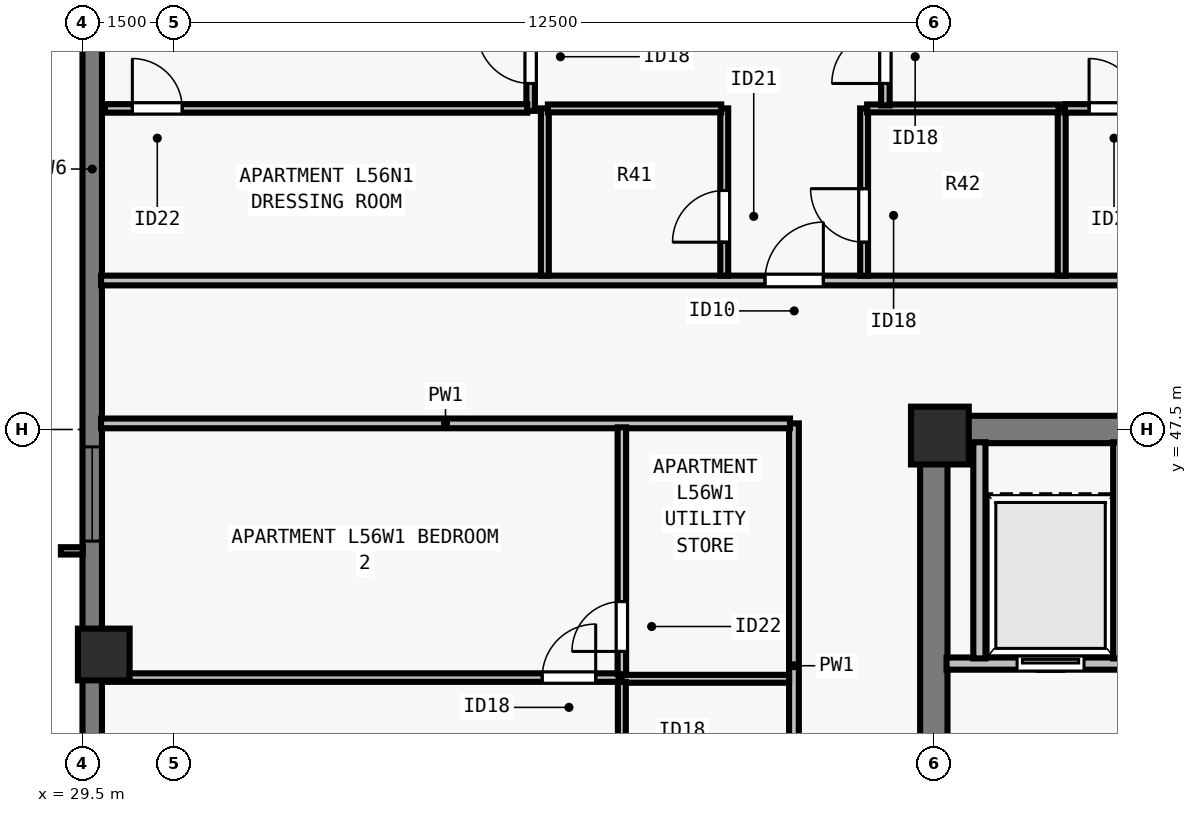
"""IFC4 building model, lengths in metres.
Left out: names, types, materials, properties, quantities, classifications, styles, units other than length and angle.
Written with IfcOpenShell. Run it as: python <this file> out.ifc"""

import sys

from ifc_helpers import new_model, si_unit, direction, frame, frame_2d, origin, origin_2d, place, context, subcontext, project, spatial, rectangle, extrude, element, fill, save


model = new_model("IFC4")
c1 = context("Model", 3, precision=1e-05, world=origin(), true_north=direction((0.0, 1.0)))
c2 = subcontext(c1, "Body", "Model", "MODEL_VIEW")
j1 = project(units=[si_unit("LENGTHUNIT", "METRE"), si_unit("PLANEANGLEUNIT", "RADIAN")], contexts=[c1])
p1 = place(None, origin())
s1 = spatial("IfcSite", under=j1, at=p1, CompositionType="ELEMENT")
p2 = place(p1, origin())
s2 = spatial("IfcBuilding", under=s1, at=p2, CompositionType="ELEMENT")
p3 = place(p2, frame((0.0, 0.0, 206.0)))
s3 = spatial("IfcBuildingStorey", under=s2, at=p3, CompositionType="ELEMENT", Elevation=206.0)
p4 = place(p3, frame((43.6, 47.4, 0.0), z_axis=(0.0, 0.0, 1.0), x_axis=(1.0, 0.0, 0.0)))
e1 = element("IfcColumn", 1, at=p4, inside=s3, PredefinedType="COLUMN", context=c2, shape_type="SweptSolid", body=[
    extrude(rectangle(XDim=0.95, YDim=0.95, at=origin_2d()), origin(), (0.0, 0.0, 1.0), 3.5),
])
p5 = place(p3, frame((29.85, 43.8, 0.0), z_axis=(0.0, 0.0, 1.0), x_axis=(0.0, 1.0, 0.0)))
e2 = element("IfcColumn", 2, at=p5, inside=s3, PredefinedType="COLUMN", context=c2, shape_type="SweptSolid", body=[
    extrude(rectangle(XDim=0.85, YDim=0.85, at=origin_2d()), origin(), (0.0, 0.0, 1.0), 3.5),
])
p6 = place(p3, frame((29.66, 21.5, 0.0), z_axis=(0.0, 0.0, 1.0), x_axis=(0.0, 1.0, 0.0)))
e3 = element("IfcWall", 3, at=p6, inside=s3, PredefinedType="SOLIDWALL", context=c2, shape_type="SweptSolid", body=[
    extrude(rectangle(XDim=34.702, YDim=0.32, at=frame_2d((17.351, 0.0))), origin(), (0.0, 0.0, 1.0), 3.29),
])
p7 = place(p6, frame((4.312, 0.0, 0.8)))
e4 = element("IfcOpeningElement", 4, at=p7, cuts=e3, PredefinedType="OPENING", context=c2, shape_type="SweptSolid", body=[
    extrude(rectangle(XDim=1.55, YDim=1.678, at=frame_2d((0.775, 0.839))), frame((0.0, 0.17, 0.0), z_axis=(0.0, -1.0, 0.0), x_axis=(1.0, 0.0, 0.0)), (0.0, 0.0, 1.0), 0.34),
])
p8 = place(p6, frame((9.238, 0.0, 0.8)))
e5 = element("IfcOpeningElement", 5, at=p8, cuts=e3, PredefinedType="OPENING", context=c2, shape_type="SweptSolid", body=[
    extrude(rectangle(XDim=1.85, YDim=1.678, at=frame_2d((0.925, 0.839))), frame((0.0, 0.17, 0.0), z_axis=(0.0, -1.0, 0.0), x_axis=(1.0, 0.0, 0.0)), (0.0, 0.0, 1.0), 0.34),
])
p9 = place(p6, frame((14.738, 0.0, 0.8)))
e6 = element("IfcOpeningElement", 6, at=p9, cuts=e3, PredefinedType="OPENING", context=c2, shape_type="SweptSolid", body=[
    extrude(rectangle(XDim=1.85, YDim=1.678, at=frame_2d((0.925, 0.839))), frame((0.0, 0.17, 0.0), z_axis=(0.0, -1.0, 0.0), x_axis=(1.0, 0.0, 0.0)), (0.0, 0.0, 1.0), 0.34),
])
p10 = place(p6, frame((17.014, 0.0, 0.8)))
e7 = element("IfcOpeningElement", 7, at=p10, cuts=e3, PredefinedType="OPENING", context=c2, shape_type="SweptSolid", body=[
    extrude(rectangle(XDim=1.55, YDim=1.678, at=frame_2d((0.775, 0.839))), frame((0.0, 0.17, 0.0), z_axis=(0.0, -1.0, 0.0), x_axis=(1.0, 0.0, 0.0)), (0.0, 0.0, 1.0), 0.34),
])
p11 = place(p6, frame((24.164, 0.0, 0.8)))
e8 = element("IfcOpeningElement", 8, at=p11, cuts=e3, PredefinedType="OPENING", context=c2, shape_type="SweptSolid", body=[
    extrude(rectangle(XDim=1.55, YDim=1.678, at=frame_2d((0.775, 0.839))), frame((0.0, 0.17, 0.0), z_axis=(0.0, -1.0, 0.0), x_axis=(1.0, 0.0, 0.0)), (0.0, 0.0, 1.0), 0.34),
])
p12 = place(p3, frame((43.275, 47.5, 0.0), z_axis=(0.0, 0.0, 1.0), x_axis=(1.0, 0.0, 0.0)))
e9 = element("IfcWall", 9, at=p12, inside=s3, PredefinedType="SHEAR", context=c2, shape_type="SweptSolid", body=[
    extrude(rectangle(XDim=17.45, YDim=0.45, at=frame_2d((8.725, 0.0))), origin(), (0.0, 0.0, 1.0), 3.29),
])
p13 = place(p3, frame((43.5, 40.8, 0.0), z_axis=(0.0, 0.0, 1.0), x_axis=(0.0, 1.0, 0.0)))
e10 = element("IfcWall", 10, at=p13, inside=s3, PredefinedType="SHEAR", context=c2, shape_type="SweptSolid", body=[
    extrude(rectangle(XDim=6.485, YDim=0.45, at=frame_2d((3.242, 0.0))), origin(), (0.0, 0.0, 1.0), 3.29),
])
p14 = place(p3, frame((43.71, 43.65, 0.0), z_axis=(0.0, 0.0, 1.0), x_axis=(1.0, 0.0, 0.0)))
e11 = element("IfcWall", 11, at=p14, inside=s3, PredefinedType="SOLIDWALL", context=c2, shape_type="SweptSolid", body=[
    extrude(rectangle(XDim=3.555, YDim=0.2, at=frame_2d((1.777, 0.0))), origin(), (0.0, 0.0, 1.0), 3.29),
])
p15 = place(p14, frame((1.16, 0.0, 0.0)))
e12 = element("IfcOpeningElement", 12, at=p15, cuts=e11, PredefinedType="OPENING", context=c2, shape_type="SweptSolid", body=[
    extrude(rectangle(XDim=1.1, YDim=2.2, at=frame_2d((0.55, 1.1))), frame((0.0, 0.11, 0.0), z_axis=(0.0, -1.0, 0.0), x_axis=(1.0, 0.0, 0.0)), (0.0, 0.0, 1.0), 0.22),
])
for number, where, z_axis, x_axis in (
    (13, (46.55, 43.735, 0.0), (0.0, 0.0, 1.0), (0.0, 1.0, 0.0)),
    (14, (44.25, 43.735, 0.0), (0.0, 0.0, 1.0), (0.0, 1.0, 0.0)),
):
    element("IfcWall", number, at=place(p3, frame(where, z_axis=z_axis, x_axis=x_axis)), inside=s3, PredefinedType="SOLIDWALL", context=c2, shape_type="SweptSolid", body=[
        extrude(rectangle(XDim=3.555, YDim=0.2, at=frame_2d((1.777, 0.0))), origin(), (0.0, 0.0, 1.0), 3.29),
    ])
p16 = place(p3, frame((29.805, 49.95, 0.0), z_axis=(0.0, 0.0, 1.0), x_axis=(1.0, 0.0, 0.0)))
e15 = element("IfcWall", 15, at=p16, inside=s3, PredefinedType="PARTITIONING", context=c2, shape_type="SweptSolid", body=[
    extrude(rectangle(XDim=44.39, YDim=0.16, at=frame_2d((22.195, 0.0))), origin(), (0.0, 0.0, 1.0), 2.958),
])
p17 = place(p16, frame((10.919, 0.0, 0.0)))
e16 = element("IfcOpeningElement", 16, at=p17, cuts=e15, PredefinedType="OPENING", context=c2, shape_type="SweptSolid", body=[
    extrude(rectangle(XDim=0.96, YDim=2.18, at=frame_2d((0.48, 1.09))), frame((0.0, 0.09, 0.0), z_axis=(0.0, -1.0, 0.0), x_axis=(1.0, 0.0, 0.0)), (0.0, 0.0, 1.0), 0.18),
])
p18 = place(p16, frame((32.999, 0.0, 0.0)))
e17 = element("IfcOpeningElement", 17, at=p18, cuts=e15, PredefinedType="OPENING", context=c2, shape_type="SweptSolid", body=[
    extrude(rectangle(XDim=0.96, YDim=2.18, at=frame_2d((0.48, 1.09))), frame((0.0, 0.09, 0.0), z_axis=(0.0, -1.0, 0.0), x_axis=(1.0, 0.0, 0.0)), (0.0, 0.0, 1.0), 0.18),
])
p19 = place(p3, frame((41.2, 30.4, 0.0), z_axis=(0.0, 0.0, 1.0), x_axis=(0.0, 1.0, 0.0)))
e18 = element("IfcWall", 18, at=p19, inside=s3, PredefinedType="PARTITIONING", context=c2, shape_type="SweptSolid", body=[
    extrude(rectangle(XDim=17.2, YDim=0.16, at=frame_2d((8.6, 0.0))), origin(), (0.0, 0.0, 1.0), 3.29),
])
p20 = place(p19, frame((8.12, 0.0, 0.0)))
e19 = element("IfcOpeningElement", 19, at=p20, cuts=e18, PredefinedType="OPENING", context=c2, shape_type="SweptSolid", body=[
    extrude(rectangle(XDim=0.96, YDim=2.18, at=frame_2d((0.48, 1.09))), frame((0.0, 0.09, 0.0), z_axis=(0.0, -1.0, 0.0), x_axis=(1.0, 0.0, 0.0)), (0.0, 0.0, 1.0), 0.18),
])
p21 = place(p3, frame((29.805, 47.6, 0.0), z_axis=(0.0, 0.0, 1.0), x_axis=(1.0, 0.0, 0.0)))
e20 = element("IfcWall", 20, at=p21, inside=s3, PredefinedType="PARTITIONING", context=c2, shape_type="SweptSolid", body=[
    extrude(rectangle(XDim=11.33, YDim=0.16, at=frame_2d((5.665, 0.0))), origin(), (0.0, 0.0, 1.0), 3.29),
])
p22 = place(p3, frame((37.104, 50.03, 0.0), z_axis=(0.0, 0.0, 1.0), x_axis=(0.0, 1.0, 0.0)))
e21 = element("IfcWall", 21, at=p22, inside=s3, PredefinedType="PLUMBINGWALL", context=c2, shape_type="SweptSolid", body=[
    extrude(rectangle(XDim=2.75, YDim=0.13, at=frame_2d((1.375, 0.0))), origin(), (0.0, 0.0, 1.0), 3.29),
])
p23 = place(p3, frame((40.054, 50.03, 0.0), z_axis=(0.0, 0.0, 1.0), x_axis=(0.0, 1.0, 0.0)))
e22 = element("IfcWall", 22, at=p23, inside=s3, PredefinedType="PLUMBINGWALL", context=c2, shape_type="SweptSolid", body=[
    extrude(rectangle(XDim=2.75, YDim=0.13, at=frame_2d((1.375, 0.0))), origin(), (0.0, 0.0, 1.0), 2.573),
])
p24 = place(p23, frame((0.55, 0.0, 0.0)))
e23 = element("IfcOpeningElement", 23, at=p24, cuts=e22, PredefinedType="OPENING", context=c2, shape_type="SweptSolid", body=[
    extrude(rectangle(XDim=0.85, YDim=2.08, at=frame_2d((0.425, 1.04))), frame((0.0, 0.075, 0.0), z_axis=(0.0, -1.0, 0.0), x_axis=(1.0, 0.0, 0.0)), (0.0, 0.0, 1.0), 0.15),
])
p25 = place(p3, frame((37.154, 52.78, 0.0), z_axis=(0.0, 0.0, 1.0), x_axis=(1.0, 0.0, 0.0)))
e24 = element("IfcWall", 24, at=p25, inside=s3, PredefinedType="PLUMBINGWALL", context=c2, shape_type="SweptSolid", body=[
    extrude(rectangle(XDim=2.85, YDim=0.13, at=frame_2d((1.425, 0.0))), origin(), (0.0, 0.0, 1.0), 3.29),
])
p26 = place(p3, frame((45.604, 50.03, 0.0), z_axis=(0.0, 0.0, 1.0), x_axis=(0.0, 1.0, 0.0)))
e25 = element("IfcWall", 25, at=p26, inside=s3, PredefinedType="PLUMBINGWALL", context=c2, shape_type="SweptSolid", body=[
    extrude(rectangle(XDim=2.75, YDim=0.13, at=frame_2d((1.375, 0.0))), origin(), (0.0, 0.0, 1.0), 3.29),
])
p27 = place(p3, frame((42.354, 50.03, 0.0), z_axis=(0.0, 0.0, 1.0), x_axis=(0.0, 1.0, 0.0)))
e26 = element("IfcWall", 26, at=p27, inside=s3, PredefinedType="PLUMBINGWALL", context=c2, shape_type="SweptSolid", body=[
    extrude(rectangle(XDim=2.75, YDim=0.13, at=frame_2d((1.375, 0.0))), origin(), (0.0, 0.0, 1.0), 3.29),
])
p28 = place(p27, frame((0.55, 0.0, 0.0)))
e27 = element("IfcOpeningElement", 27, at=p28, cuts=e26, PredefinedType="OPENING", context=c2, shape_type="SweptSolid", body=[
    extrude(rectangle(XDim=0.88, YDim=2.1, at=frame_2d((0.44, 1.05))), frame((0.0, 0.075, 0.0), z_axis=(0.0, -1.0, 0.0), x_axis=(1.0, 0.0, 0.0)), (0.0, 0.0, 1.0), 0.15),
])
p29 = place(p3, frame((42.404, 52.78, 0.0), z_axis=(0.0, 0.0, 1.0), x_axis=(1.0, 0.0, 0.0)))
e28 = element("IfcWall", 28, at=p29, inside=s3, PredefinedType="PLUMBINGWALL", context=c2, shape_type="SweptSolid", body=[
    extrude(rectangle(XDim=3.15, YDim=0.13, at=frame_2d((1.575, 0.0))), origin(), (0.0, 0.0, 1.0), 3.29),
])
p30 = place(p3, frame((36.87, 52.74, 0.0), z_axis=(0.0, 0.0, 1.0), x_axis=(0.0, 1.0, 0.0)))
e29 = element("IfcWall", 29, at=p30, inside=s3, PredefinedType="PARTITIONING", context=c2, shape_type="SweptSolid", body=[
    extrude(rectangle(XDim=8.38, YDim=0.14, at=frame_2d((4.19, 0.0))), origin(), (0.0, 0.0, 1.0), 2.573),
])
p31 = place(p30, frame((0.45, 0.0, 0.0)))
e30 = element("IfcOpeningElement", 30, at=p31, cuts=e29, PredefinedType="OPENING", context=c2, shape_type="SweptSolid", body=[
    extrude(rectangle(XDim=0.88, YDim=2.1, at=frame_2d((0.44, 1.05))), frame((0.0, 0.08, 0.0), z_axis=(0.0, -1.0, 0.0), x_axis=(1.0, 0.0, 0.0)), (0.0, 0.0, 1.0), 0.16),
])
p32 = place(p3, frame((29.87, 52.78, 0.0), z_axis=(0.0, 0.0, 1.0), x_axis=(1.0, 0.0, 0.0)))
e31 = element("IfcWall", 31, at=p32, inside=s3, PredefinedType="PARTITIONING", context=c2, shape_type="SweptSolid", body=[
    extrude(rectangle(XDim=6.945, YDim=0.14, at=frame_2d((3.472, 0.0))), origin(), (0.0, 0.0, 1.0), 2.958),
])
p33 = place(p32, frame((0.45, 0.0, 0.0)))
e32 = element("IfcOpeningElement", 32, at=p33, cuts=e31, PredefinedType="OPENING", context=c2, shape_type="SweptSolid", body=[
    extrude(rectangle(XDim=0.82, YDim=2.1, at=frame_2d((0.41, 1.05))), frame((0.0, 0.08, 0.0), z_axis=(0.0, -1.0, 0.0), x_axis=(1.0, 0.0, 0.0)), (0.0, 0.0, 1.0), 0.16),
])
p34 = place(p3, frame((45.654, 52.78, 0.0), z_axis=(0.0, 0.0, 1.0), x_axis=(1.0, 0.0, 0.0)))
e33 = element("IfcWall", 33, at=p34, inside=s3, PredefinedType="PARTITIONING", context=c2, shape_type="SweptSolid", body=[
    extrude(rectangle(XDim=6.884, YDim=0.14, at=frame_2d((3.442, 0.0))), origin(), (0.0, 0.0, 1.0), 3.29),
])
p35 = place(p34, frame((0.4, 0.0, 0.0)))
e34 = element("IfcOpeningElement", 34, at=p35, cuts=e33, PredefinedType="OPENING", context=c2, shape_type="SweptSolid", body=[
    extrude(rectangle(XDim=0.82, YDim=2.1, at=frame_2d((0.41, 1.05))), frame((0.0, 0.08, 0.0), z_axis=(0.0, -1.0, 0.0), x_axis=(1.0, 0.0, 0.0)), (0.0, 0.0, 1.0), 0.16),
])
p36 = place(p3, frame((42.704, 52.83, 0.0), z_axis=(0.0, 0.0, 1.0), x_axis=(0.0, 1.0, 0.0)))
e35 = element("IfcWall", 35, at=p36, inside=s3, PredefinedType="PARTITIONING", context=c2, shape_type="SweptSolid", body=[
    extrude(rectangle(XDim=8.29, YDim=0.14, at=frame_2d((4.145, 0.0))), origin(), (0.0, 0.0, 1.0), 3.29),
])
p37 = place(p36, frame((0.36, 0.0, 0.0)))
e36 = element("IfcOpeningElement", 36, at=p37, cuts=e35, PredefinedType="OPENING", context=c2, shape_type="SweptSolid", body=[
    extrude(rectangle(XDim=0.88, YDim=2.1, at=frame_2d((0.44, 1.05))), frame((0.0, 0.08, 0.0), z_axis=(0.0, -1.0, 0.0), x_axis=(1.0, 0.0, 0.0)), (0.0, 0.0, 1.0), 0.16),
])
p38 = place(p3, frame((38.37, 43.4, 0.0), z_axis=(0.0, 0.0, 1.0), x_axis=(1.0, 0.0, 0.0)))
e37 = element("IfcWall", 37, at=p38, inside=s3, PredefinedType="PLUMBINGWALL", context=c2, shape_type="SweptSolid", body=[
    extrude(rectangle(XDim=2.75, YDim=0.13, at=frame_2d((1.375, 0.0))), origin(), (0.0, 0.0, 1.0), 2.958),
])
p39 = place(p3, frame((38.37, 40.2, 0.0), z_axis=(0.0, 0.0, 1.0), x_axis=(0.0, 1.0, 0.0)))
e38 = element("IfcWall", 38, at=p39, inside=s3, PredefinedType="PLUMBINGWALL", context=c2, shape_type="SweptSolid", body=[
    extrude(rectangle(XDim=3.15, YDim=0.13, at=frame_2d((1.575, 0.0))), origin(), (0.0, 0.0, 1.0), 3.29),
])
p40 = place(p3, frame((29.88, 43.42, 0.0), z_axis=(0.0, 0.0, 1.0), x_axis=(1.0, 0.0, 0.0)))
e39 = element("IfcWall", 39, at=p40, inside=s3, PredefinedType="PARTITIONING", context=c2, shape_type="SweptSolid", body=[
    extrude(rectangle(XDim=8.44, YDim=0.14, at=frame_2d((4.22, 0.0))), origin(), (0.0, 0.0, 1.0), 3.29),
])
p41 = place(p40, frame((7.18, 0.0, 0.0)))
e40 = element("IfcOpeningElement", 40, at=p41, cuts=e39, PredefinedType="OPENING", context=c2, shape_type="SweptSolid", body=[
    extrude(rectangle(XDim=0.88, YDim=2.1, at=frame_2d((0.44, 1.05))), frame((0.0, 0.08, 0.0), z_axis=(0.0, -1.0, 0.0), x_axis=(1.0, 0.0, 0.0)), (0.0, 0.0, 1.0), 0.16),
])
p42 = place(p3, frame((38.37, 43.475, 0.0), z_axis=(0.0, 0.0, 1.0), x_axis=(0.0, 1.0, 0.0)))
e41 = element("IfcWall", 41, at=p42, inside=s3, PredefinedType="PARTITIONING", context=c2, shape_type="SweptSolid", body=[
    extrude(rectangle(XDim=4.06, YDim=0.14, at=frame_2d((2.03, 0.0))), origin(), (0.0, 0.0, 1.0), 3.29),
])
p43 = place(p42, frame((0.375, 0.0, 0.0)))
e42 = element("IfcOpeningElement", 42, at=p43, cuts=e41, PredefinedType="OPENING", context=c2, shape_type="SweptSolid", body=[
    extrude(rectangle(XDim=0.82, YDim=2.1, at=frame_2d((0.41, 1.05))), frame((0.0, 0.08, 0.0), z_axis=(0.0, -1.0, 0.0), x_axis=(1.0, 0.0, 0.0)), (0.0, 0.0, 1.0), 0.16),
])
p44 = place(p11, origin())
e43 = element("IfcWindow", 43, at=p44, inside=s3, PartitioningType="SINGLE_PANEL", PredefinedType="WINDOW", context=c2, shape_type="SweptSolid", body=[
    extrude(rectangle(XDim=1.55, YDim=1.678, at=frame_2d((0.775, 0.839))), frame((0.0, -0.05, 0.0), z_axis=(0.0, -1.0, 0.0), x_axis=(1.0, 0.0, 0.0)), (0.0, 0.0, 1.0), 0.06),
])
fill(e8, e43)
p45 = place(p15, origin())
e44 = element("IfcDoor", 44, at=p45, inside=s3, OperationType="SLIDING_TO_LEFT", PredefinedType="DOOR", context=c2, shape_type="SweptSolid", body=[
    extrude(rectangle(XDim=1.1, YDim=2.2, at=frame_2d((0.55, 1.1))), frame((0.0, 0.025, 0.0), z_axis=(0.0, -1.0, 0.0), x_axis=(1.0, 0.0, 0.0)), (0.0, 0.0, 1.0), 0.05),
])
fill(e12, e44)
p46 = place(p24, origin())
e45 = element("IfcDoor", 45, at=p46, inside=s3, OperationType="SINGLE_SWING_LEFT", PredefinedType="DOOR", context=c2, shape_type="SweptSolid", body=[
    extrude(rectangle(XDim=0.85, YDim=2.08, at=frame_2d((0.425, 1.04))), frame((0.0, 0.025, 0.0), z_axis=(0.0, -1.0, 0.0), x_axis=(1.0, 0.0, 0.0)), (0.0, 0.0, 1.0), 0.05),
])
fill(e23, e45)
p47 = place(p28, origin())
e46 = element("IfcDoor", 46, at=p47, inside=s3, OperationType="SINGLE_SWING_RIGHT", PredefinedType="DOOR", context=c2, shape_type="SweptSolid", body=[
    extrude(rectangle(XDim=0.88, YDim=2.1, at=frame_2d((0.44, 1.05))), frame((0.0, 0.025, 0.0), z_axis=(0.0, -1.0, 0.0), x_axis=(1.0, 0.0, 0.0)), (0.0, 0.0, 1.0), 0.05),
])
fill(e27, e46)
p48 = place(p33, origin())
e47 = element("IfcDoor", 47, at=p48, inside=s3, OperationType="SINGLE_SWING_LEFT", PredefinedType="DOOR", context=c2, shape_type="SweptSolid", body=[
    extrude(rectangle(XDim=0.82, YDim=2.1, at=frame_2d((0.41, 1.05))), frame((0.0, 0.025, 0.0), z_axis=(0.0, -1.0, 0.0), x_axis=(1.0, 0.0, 0.0)), (0.0, 0.0, 1.0), 0.05),
])
fill(e32, e47)
p49 = place(p31, origin())
e48 = element("IfcDoor", 48, at=p49, inside=s3, OperationType="SINGLE_SWING_RIGHT", PredefinedType="DOOR", context=c2, shape_type="SweptSolid", body=[
    extrude(rectangle(XDim=0.88, YDim=2.1, at=frame_2d((0.44, 1.05))), frame((0.0, 0.025, 0.0), z_axis=(0.0, -1.0, 0.0), x_axis=(1.0, 0.0, 0.0)), (0.0, 0.0, 1.0), 0.05),
])
fill(e30, e48)
p50 = place(p35, origin())
e49 = element("IfcDoor", 49, at=p50, inside=s3, OperationType="SINGLE_SWING_LEFT", PredefinedType="DOOR", context=c2, shape_type="SweptSolid", body=[
    extrude(rectangle(XDim=0.82, YDim=2.1, at=frame_2d((0.41, 1.05))), frame((0.0, 0.025, 0.0), z_axis=(0.0, -1.0, 0.0), x_axis=(1.0, 0.0, 0.0)), (0.0, 0.0, 1.0), 0.05),
])
fill(e34, e49)
p51 = place(p37, origin())
e50 = element("IfcDoor", 50, at=p51, inside=s3, OperationType="SINGLE_SWING_LEFT", PredefinedType="DOOR", context=c2, shape_type="SweptSolid", body=[
    extrude(rectangle(XDim=0.88, YDim=2.1, at=frame_2d((0.44, 1.05))), frame((0.0, 0.025, 0.0), z_axis=(0.0, -1.0, 0.0), x_axis=(1.0, 0.0, 0.0)), (0.0, 0.0, 1.0), 0.05),
])
fill(e36, e50)
p52 = place(p17, origin())
e51 = element("IfcDoor", 51, at=p52, inside=s3, OperationType="SINGLE_SWING_RIGHT", PredefinedType="DOOR", context=c2, shape_type="SweptSolid", body=[
    extrude(rectangle(XDim=0.96, YDim=2.18, at=frame_2d((0.48, 1.09))), frame((0.0, 0.025, 0.0), z_axis=(0.0, -1.0, 0.0), x_axis=(1.0, 0.0, 0.0)), (0.0, 0.0, 1.0), 0.05),
])
fill(e16, e51)
p53 = place(p43, origin())
e52 = element("IfcDoor", 52, at=p53, inside=s3, OperationType="SINGLE_SWING_LEFT", PredefinedType="DOOR", context=c2, shape_type="SweptSolid", body=[
    extrude(rectangle(XDim=0.82, YDim=2.1, at=frame_2d((0.41, 1.05))), frame((0.0, 0.025, 0.0), z_axis=(0.0, -1.0, 0.0), x_axis=(1.0, 0.0, 0.0)), (0.0, 0.0, 1.0), 0.05),
])
fill(e42, e52)
p54 = place(p41, origin())
e53 = element("IfcDoor", 53, at=p54, inside=s3, OperationType="SINGLE_SWING_RIGHT", PredefinedType="DOOR", context=c2, shape_type="SweptSolid", body=[
    extrude(rectangle(XDim=0.88, YDim=2.1, at=frame_2d((0.44, 1.05))), frame((0.0, 0.025, 0.0), z_axis=(0.0, -1.0, 0.0), x_axis=(1.0, 0.0, 0.0)), (0.0, 0.0, 1.0), 0.05),
])
fill(e40, e53)
save(model, sys.argv[1])
